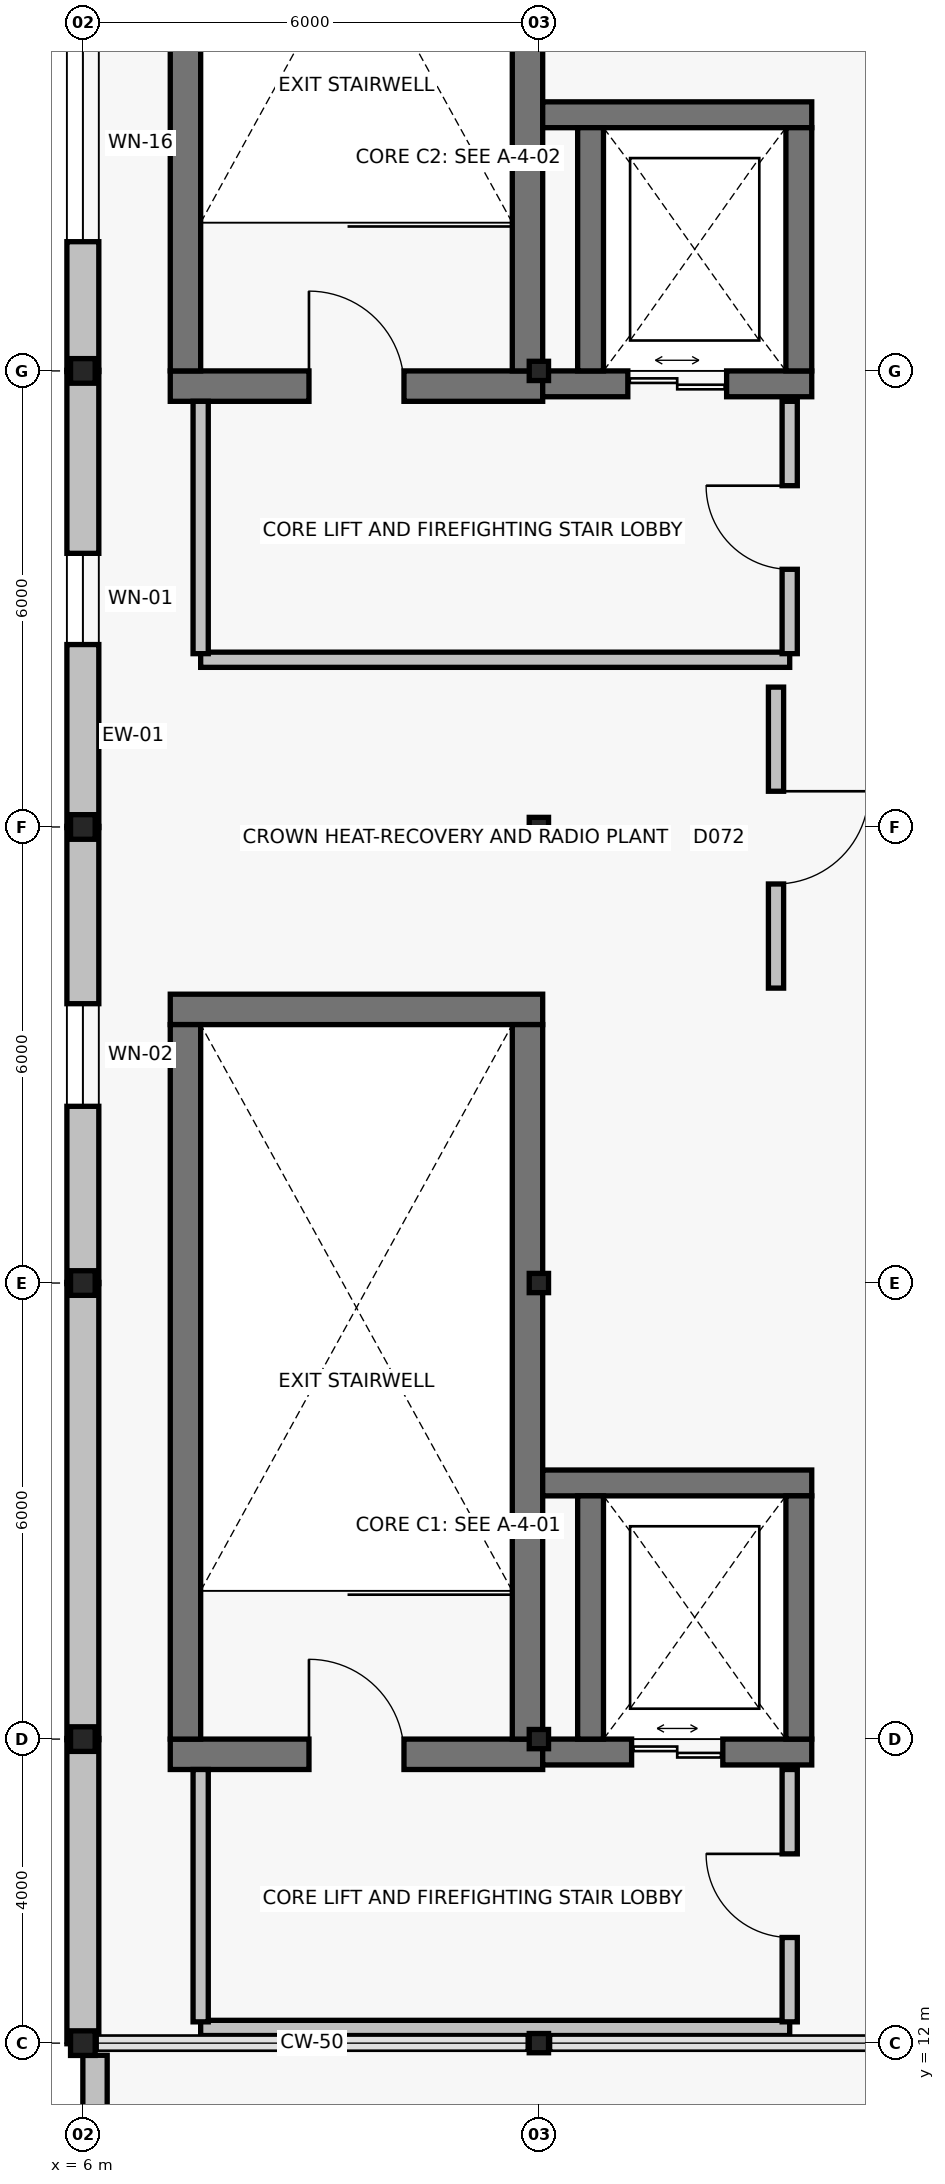
"""IFC4 building model, lengths in metres.
Left out: names, types, materials, properties, quantities, classifications, styles, units other than length and angle.
Written with IfcOpenShell. Run it as: python <this file> out.ifc"""

import sys

from ifc_helpers import new_model, si_unit, direction, frame, frame_2d, origin, origin_2d, place, context, subcontext, project, spatial, rectangle, hollow_circle, i_section, extrude, element, fill, save


model = new_model("IFC4")
c1 = context("Model", 3, precision=1e-05, world=origin(), true_north=direction((0.0, 1.0)))
c2 = subcontext(c1, "Body", "Model", "MODEL_VIEW")
j1 = project(units=[si_unit("LENGTHUNIT", "METRE"), si_unit("PLANEANGLEUNIT", "RADIAN")], contexts=[c1])
p1 = place(None, origin())
s1 = spatial("IfcSite", under=j1, at=p1, CompositionType="ELEMENT")
p2 = place(p1, origin())
s2 = spatial("IfcBuilding", under=s1, at=p2, CompositionType="ELEMENT")
p3 = place(p2, frame((0.0, 0.0, 28.6)))
s3 = spatial("IfcBuildingStorey", under=s2, at=p3, CompositionType="ELEMENT", Elevation=28.6)
for number, where, z_axis, x_axis in (
    (1, (6.0, 12.0, 0.0), (0.0, 0.0, 1.0), (1.0, 0.0, 0.0)),
    (2, (6.0, 16.0, 0.0), (0.0, 0.0, 1.0), (1.0, 0.0, 0.0)),
    (3, (6.0, 22.0, 0.0), (0.0, 0.0, 1.0), (1.0, 0.0, 0.0)),
    (4, (6.0, 28.0, 0.0), (0.0, 0.0, 1.0), (1.0, 0.0, 0.0)),
    (5, (6.0, 34.0, 0.0), (0.0, 0.0, 1.0), (1.0, 0.0, 0.0)),
):
    element("IfcColumn", number, at=place(p3, frame(where, z_axis=z_axis, x_axis=x_axis)), inside=s3, PredefinedType="COLUMN", context=c2, shape_type="SweptSolid", body=[
        extrude(hollow_circle(Radius=0.162, WallThickness=0.013, at=origin_2d()), origin(), (0.0, 0.0, 1.0), 4.2),
    ])
for number, where, z_axis, x_axis in (
    (6, (12.0, 12.0, 0.0), (0.0, 0.0, 1.0), (1.0, 0.0, 0.0)),
    (7, (12.0, 16.0, 0.0), (0.0, 0.0, 1.0), (1.0, 0.0, 0.0)),
    (8, (12.0, 22.0, 0.0), (0.0, 0.0, 1.0), (1.0, 0.0, 0.0)),
    (9, (12.0, 28.0, 0.0), (0.0, 0.0, 1.0), (1.0, 0.0, 0.0)),
    (10, (12.0, 34.0, 0.0), (0.0, 0.0, 1.0), (1.0, 0.0, 0.0)),
):
    element("IfcColumn", number, at=place(p3, frame(where, z_axis=z_axis, x_axis=x_axis)), inside=s3, PredefinedType="COLUMN", context=c2, shape_type="SweptSolid", body=[
        extrude(i_section(OverallWidth=0.254, OverallDepth=0.253, WebThickness=0.009, FlangeThickness=0.014, FilletRadius=0.012, at=origin_2d()), origin(), (0.0, 0.0, 1.0), 4.2),
    ])
p4 = place(p3, frame((6.0, 40.008, 0.0), z_axis=(0.0, 0.0, 1.0), x_axis=(0.0, -1.0, 0.0)))
e11 = element("IfcWall", 11, at=p4, inside=s3, PredefinedType="SOLIDWALL", context=c2, shape_type="SweptSolid", body=[
    extrude(rectangle(XDim=6.016, YDim=0.42, at=frame_2d((3.008, 0.0))), origin(), (0.0, 0.0, 1.0), 3.497),
])
p5 = place(p4, frame((1.708, 0.0, 0.9)))
e12 = element("IfcOpeningElement", 12, at=p5, cuts=e11, PredefinedType="OPENING", context=c2, shape_type="SweptSolid", body=[
    extrude(rectangle(XDim=2.6, YDim=2.1, at=frame_2d((1.3, 1.05))), frame((0.0, 0.225, 0.0), z_axis=(0.0, -1.0, 0.0), x_axis=(1.0, 0.0, 0.0)), (0.0, 0.0, 1.0), 0.45),
])
p6 = place(p3, frame((6.0, 34.008, 0.0), z_axis=(0.0, 0.0, 1.0), x_axis=(0.0, -1.0, 0.0)))
e13 = element("IfcWall", 13, at=p6, inside=s3, PredefinedType="SOLIDWALL", context=c2, shape_type="SweptSolid", body=[
    extrude(rectangle(XDim=6.016, YDim=0.42, at=frame_2d((3.008, 0.0))), origin(), (0.0, 0.0, 1.0), 3.497),
])
p7 = place(p6, frame((2.408, 0.0, 0.9)))
e14 = element("IfcOpeningElement", 14, at=p7, cuts=e13, PredefinedType="OPENING", context=c2, shape_type="SweptSolid", body=[
    extrude(rectangle(XDim=1.2, YDim=1.8, at=frame_2d((0.6, 0.9))), frame((0.0, 0.225, 0.0), z_axis=(0.0, -1.0, 0.0), x_axis=(1.0, 0.0, 0.0)), (0.0, 0.0, 1.0), 0.45),
])
p8 = place(p3, frame((6.0, 28.008, 0.0), z_axis=(0.0, 0.0, 1.0), x_axis=(0.0, -1.0, 0.0)))
e15 = element("IfcWall", 15, at=p8, inside=s3, PredefinedType="SOLIDWALL", context=c2, shape_type="SweptSolid", body=[
    extrude(rectangle(XDim=6.016, YDim=0.42, at=frame_2d((3.008, 0.0))), origin(), (0.0, 0.0, 1.0), 3.497),
])
p9 = place(p8, frame((2.333, 0.0, 0.9)))
e16 = element("IfcOpeningElement", 16, at=p9, cuts=e15, PredefinedType="OPENING", context=c2, shape_type="SweptSolid", body=[
    extrude(rectangle(XDim=1.35, YDim=1.8, at=frame_2d((0.675, 0.9))), frame((0.0, 0.225, 0.0), z_axis=(0.0, -1.0, 0.0), x_axis=(1.0, 0.0, 0.0)), (0.0, 0.0, 1.0), 0.45),
])
p10 = place(p3, frame((6.0, 22.008, 0.0), z_axis=(0.0, 0.0, 1.0), x_axis=(0.0, -1.0, 0.0)))
e17 = element("IfcWall", 17, at=p10, inside=s3, PredefinedType="SOLIDWALL", context=c2, shape_type="SweptSolid", body=[
    extrude(rectangle(XDim=6.016, YDim=0.42, at=frame_2d((3.008, 0.0))), origin(), (0.0, 0.0, 1.0), 3.497),
])
p11 = place(p3, frame((6.0, 16.008, 0.0), z_axis=(0.0, 0.0, 1.0), x_axis=(0.0, -1.0, 0.0)))
e18 = element("IfcWall", 18, at=p11, inside=s3, PredefinedType="SOLIDWALL", context=c2, shape_type="SweptSolid", body=[
    extrude(rectangle(XDim=4.016, YDim=0.42, at=frame_2d((2.008, 0.0))), origin(), (0.0, 0.0, 1.0), 3.55),
])
p12 = place(p3, frame((6.16, 4.66, 0.0), z_axis=(0.0, 0.0, 1.0), x_axis=(0.0, 1.0, 0.0)))
e19 = element("IfcWall", 19, at=p12, inside=s3, PredefinedType="PARAPET", context=c2, shape_type="SweptSolid", body=[
    extrude(rectangle(XDim=7.18, YDim=0.32, at=frame_2d((3.59, 0.0))), origin(), (0.0, 0.0, 1.0), 1.15),
])
p13 = place(p3, frame((7.15, 15.8, 0.0), z_axis=(0.0, 0.0, 1.0), x_axis=(1.0, 0.0, 0.0)))
e20 = element("IfcWall", 20, at=p13, inside=s3, PredefinedType="SHEAR", context=c2, shape_type="SweptSolid", body=[
    extrude(rectangle(XDim=4.9, YDim=0.4, at=frame_2d((2.45, 0.0))), origin(), (0.0, 0.0, 1.0), 4.0),
])
p14 = place(p13, frame((1.825, 0.0, 0.0)))
e21 = element("IfcOpeningElement", 21, at=p14, cuts=e20, PredefinedType="OPENING", context=c2, shape_type="SweptSolid", body=[
    extrude(rectangle(XDim=1.25, YDim=2.2, at=frame_2d((0.625, 1.1))), frame((0.0, 0.215, 0.0), z_axis=(0.0, -1.0, 0.0), x_axis=(1.0, 0.0, 0.0)), (0.0, 0.0, 1.0), 0.43),
])
p15 = place(p3, frame((12.05, 25.6, 0.0), z_axis=(0.0, 0.0, 1.0), x_axis=(-1.0, 0.0, 0.0)))
e22 = element("IfcWall", 22, at=p15, inside=s3, PredefinedType="SHEAR", context=c2, shape_type="SweptSolid", body=[
    extrude(rectangle(XDim=4.9, YDim=0.4, at=frame_2d((2.45, 0.0))), origin(), (0.0, 0.0, 1.0), 4.0),
])
for number, where, z_axis, x_axis in (
    (23, (7.35, 25.4, 0.0), (0.0, 0.0, 1.0), (0.0, -1.0, 0.0)),
    (24, (11.85, 16.0, 0.0), (0.0, 0.0, 1.0), (0.0, 1.0, 0.0)),
):
    element("IfcWall", number, at=place(p3, frame(where, z_axis=z_axis, x_axis=x_axis)), inside=s3, PredefinedType="SHEAR", context=c2, shape_type="SweptSolid", body=[
        extrude(rectangle(XDim=9.4, YDim=0.4, at=frame_2d((4.7, 0.0))), origin(), (0.0, 0.0, 1.0), 4.0),
    ])
p16 = place(p3, frame((12.05, 15.83, 0.0), z_axis=(0.0, 0.0, 1.0), x_axis=(1.0, 0.0, 0.0)))
e25 = element("IfcWall", 25, at=p16, inside=s3, PredefinedType="SHEAR", context=c2, shape_type="SweptSolid", body=[
    extrude(rectangle(XDim=3.54, YDim=0.34, at=frame_2d((1.77, 0.0))), origin(), (0.0, 0.0, 1.0), 4.0),
])
p17 = place(p16, frame((1.17, 0.0, 0.0)))
e26 = element("IfcOpeningElement", 26, at=p17, cuts=e25, PredefinedType="OPENING", context=c2, shape_type="SweptSolid", body=[
    extrude(rectangle(XDim=1.2, YDim=2.2, at=frame_2d((0.6, 1.1))), frame((0.0, 0.185, 0.0), z_axis=(0.0, -1.0, 0.0), x_axis=(1.0, 0.0, 0.0)), (0.0, 0.0, 1.0), 0.37),
])
p18 = place(p3, frame((15.59, 19.37, 0.0), z_axis=(0.0, 0.0, 1.0), x_axis=(-1.0, 0.0, 0.0)))
e27 = element("IfcWall", 27, at=p18, inside=s3, PredefinedType="SHEAR", context=c2, shape_type="SweptSolid", body=[
    extrude(rectangle(XDim=3.54, YDim=0.34, at=frame_2d((1.77, 0.0))), origin(), (0.0, 0.0, 1.0), 4.0),
])
for number, where, z_axis, x_axis in (
    (28, (12.68, 19.2, 0.0), (0.0, 0.0, 1.0), (0.0, -1.0, 0.0)),
    (29, (15.42, 16.0, 0.0), (0.0, 0.0, 1.0), (0.0, 1.0, 0.0)),
):
    element("IfcWall", number, at=place(p3, frame(where, z_axis=z_axis, x_axis=x_axis)), inside=s3, PredefinedType="SHEAR", context=c2, shape_type="SweptSolid", body=[
        extrude(rectangle(XDim=3.2, YDim=0.34, at=frame_2d((1.6, 0.0))), origin(), (0.0, 0.0, 1.0), 4.0),
    ])
p19 = place(p3, frame((7.55, 12.2, 0.0), z_axis=(0.0, 0.0, 1.0), x_axis=(1.0, 0.0, 0.0)))
e30 = element("IfcWall", 30, at=p19, inside=s3, PredefinedType="PARTITIONING", context=c2, shape_type="SweptSolid", body=[
    extrude(rectangle(XDim=7.75, YDim=0.2, at=frame_2d((3.875, 0.0))), origin(), (0.0, 0.0, 1.0), 3.497),
])
p20 = place(p3, frame((7.55, 15.6, 0.0), z_axis=(0.0, 0.0, 1.0), x_axis=(0.0, -1.0, 0.0)))
e31 = element("IfcWall", 31, at=p20, inside=s3, PredefinedType="PARTITIONING", context=c2, shape_type="SweptSolid", body=[
    extrude(rectangle(XDim=3.32, YDim=0.2, at=frame_2d((1.66, 0.0))), origin(), (0.0, 0.0, 1.0), 3.55),
])
p21 = place(p3, frame((15.3, 12.28, 0.0), z_axis=(0.0, 0.0, 1.0), x_axis=(0.0, 1.0, 0.0)))
e32 = element("IfcWall", 32, at=p21, inside=s3, PredefinedType="PARTITIONING", context=c2, shape_type="SweptSolid", body=[
    extrude(rectangle(XDim=3.32, YDim=0.2, at=frame_2d((1.66, 0.0))), origin(), (0.0, 0.0, 1.0), 3.604),
])
p22 = place(p21, frame((1.11, 0.0, 0.0)))
e33 = element("IfcOpeningElement", 33, at=p22, cuts=e32, PredefinedType="OPENING", context=c2, shape_type="SweptSolid", body=[
    extrude(rectangle(XDim=1.1, YDim=2.15, at=frame_2d((0.55, 1.075))), frame((0.0, 0.115, 0.0), z_axis=(0.0, -1.0, 0.0), x_axis=(1.0, 0.0, 0.0)), (0.0, 0.0, 1.0), 0.23),
])
p23 = place(p3, frame((7.15, 33.8, 0.0), z_axis=(0.0, 0.0, 1.0), x_axis=(1.0, 0.0, 0.0)))
e34 = element("IfcWall", 34, at=p23, inside=s3, PredefinedType="SHEAR", context=c2, shape_type="SweptSolid", body=[
    extrude(rectangle(XDim=4.9, YDim=0.4, at=frame_2d((2.45, 0.0))), origin(), (0.0, 0.0, 1.0), 4.0),
])
p24 = place(p23, frame((1.825, 0.0, 0.0)))
e35 = element("IfcOpeningElement", 35, at=p24, cuts=e34, PredefinedType="OPENING", context=c2, shape_type="SweptSolid", body=[
    extrude(rectangle(XDim=1.25, YDim=2.2, at=frame_2d((0.625, 1.1))), frame((0.0, 0.215, 0.0), z_axis=(0.0, -1.0, 0.0), x_axis=(1.0, 0.0, 0.0)), (0.0, 0.0, 1.0), 0.43),
])
for number, where, z_axis, x_axis in (
    (36, (7.35, 43.4, 0.0), (0.0, 0.0, 1.0), (0.0, -1.0, 0.0)),
    (37, (11.85, 34.0, 0.0), (0.0, 0.0, 1.0), (0.0, 1.0, 0.0)),
):
    element("IfcWall", number, at=place(p3, frame(where, z_axis=z_axis, x_axis=x_axis)), inside=s3, PredefinedType="SHEAR", context=c2, shape_type="SweptSolid", body=[
        extrude(rectangle(XDim=9.4, YDim=0.4, at=frame_2d((4.7, 0.0))), origin(), (0.0, 0.0, 1.0), 4.0),
    ])
p25 = place(p3, frame((12.05, 33.83, 0.0), z_axis=(0.0, 0.0, 1.0), x_axis=(1.0, 0.0, 0.0)))
e38 = element("IfcWall", 38, at=p25, inside=s3, PredefinedType="SHEAR", context=c2, shape_type="SweptSolid", body=[
    extrude(rectangle(XDim=3.54, YDim=0.34, at=frame_2d((1.77, 0.0))), origin(), (0.0, 0.0, 1.0), 4.0),
])
p26 = place(p25, frame((1.12, 0.0, 0.0)))
e39 = element("IfcOpeningElement", 39, at=p26, cuts=e38, PredefinedType="OPENING", context=c2, shape_type="SweptSolid", body=[
    extrude(rectangle(XDim=1.3, YDim=2.25, at=frame_2d((0.65, 1.125))), frame((0.0, 0.185, 0.0), z_axis=(0.0, -1.0, 0.0), x_axis=(1.0, 0.0, 0.0)), (0.0, 0.0, 1.0), 0.37),
])
p27 = place(p3, frame((15.59, 37.37, 0.0), z_axis=(0.0, 0.0, 1.0), x_axis=(-1.0, 0.0, 0.0)))
e40 = element("IfcWall", 40, at=p27, inside=s3, PredefinedType="SHEAR", context=c2, shape_type="SweptSolid", body=[
    extrude(rectangle(XDim=3.54, YDim=0.34, at=frame_2d((1.77, 0.0))), origin(), (0.0, 0.0, 1.0), 4.0),
])
for number, where, z_axis, x_axis in (
    (41, (12.68, 37.2, 0.0), (0.0, 0.0, 1.0), (0.0, -1.0, 0.0)),
    (42, (15.42, 34.0, 0.0), (0.0, 0.0, 1.0), (0.0, 1.0, 0.0)),
):
    element("IfcWall", number, at=place(p3, frame(where, z_axis=z_axis, x_axis=x_axis)), inside=s3, PredefinedType="SHEAR", context=c2, shape_type="SweptSolid", body=[
        extrude(rectangle(XDim=3.2, YDim=0.34, at=frame_2d((1.6, 0.0))), origin(), (0.0, 0.0, 1.0), 4.0),
    ])
p28 = place(p3, frame((7.55, 30.2, 0.0), z_axis=(0.0, 0.0, 1.0), x_axis=(1.0, 0.0, 0.0)))
e43 = element("IfcWall", 43, at=p28, inside=s3, PredefinedType="PARTITIONING", context=c2, shape_type="SweptSolid", body=[
    extrude(rectangle(XDim=7.75, YDim=0.2, at=frame_2d((3.875, 0.0))), origin(), (0.0, 0.0, 1.0), 3.497),
])
p29 = place(p3, frame((7.55, 33.6, 0.0), z_axis=(0.0, 0.0, 1.0), x_axis=(0.0, -1.0, 0.0)))
e44 = element("IfcWall", 44, at=p29, inside=s3, PredefinedType="PARTITIONING", context=c2, shape_type="SweptSolid", body=[
    extrude(rectangle(XDim=3.32, YDim=0.2, at=frame_2d((1.66, 0.0))), origin(), (0.0, 0.0, 1.0), 4.0),
])
p30 = place(p3, frame((15.3, 30.28, 0.0), z_axis=(0.0, 0.0, 1.0), x_axis=(0.0, 1.0, 0.0)))
e45 = element("IfcWall", 45, at=p30, inside=s3, PredefinedType="PARTITIONING", context=c2, shape_type="SweptSolid", body=[
    extrude(rectangle(XDim=3.32, YDim=0.2, at=frame_2d((1.66, 0.0))), origin(), (0.0, 0.0, 1.0), 4.0),
])
p31 = place(p30, frame((1.11, 0.0, 0.0)))
e46 = element("IfcOpeningElement", 46, at=p31, cuts=e45, PredefinedType="OPENING", context=c2, shape_type="SweptSolid", body=[
    extrude(rectangle(XDim=1.1, YDim=2.15, at=frame_2d((0.55, 1.075))), frame((0.0, 0.115, 0.0), z_axis=(0.0, -1.0, 0.0), x_axis=(1.0, 0.0, 0.0)), (0.0, 0.0, 1.0), 0.23),
])
p32 = place(p3, frame((15.12, 29.84, 0.0), z_axis=(0.0, 0.0, 1.0), x_axis=(0.0, -1.0, 0.0)))
e47 = element("IfcWall", 47, at=p32, inside=s3, PredefinedType="PARTITIONING", context=c2, shape_type="SweptSolid", body=[
    extrude(rectangle(XDim=3.96, YDim=0.2, at=frame_2d((1.98, 0.0))), origin(), (0.0, 0.0, 1.0), 3.606),
])
p33 = place(p32, frame((1.37, 0.0, 0.0)))
e48 = element("IfcOpeningElement", 48, at=p33, cuts=e47, PredefinedType="OPENING", context=c2, shape_type="SweptSolid", body=[
    extrude(rectangle(XDim=1.22, YDim=2.2, at=frame_2d((0.61, 1.1))), frame((0.0, 0.115, 0.0), z_axis=(0.0, -1.0, 0.0), x_axis=(1.0, 0.0, 0.0)), (0.0, 0.0, 1.0), 0.23),
])
p34 = place(p5, origin())
e49 = element("IfcWindow", 49, at=p34, inside=s3, PartitioningType="SINGLE_PANEL", PredefinedType="WINDOW", context=c2, shape_type="SweptSolid", body=[
    extrude(rectangle(XDim=2.6, YDim=2.1, at=frame_2d((1.3, 1.05))), frame((0.0, 0.03, 0.0), z_axis=(0.0, -1.0, 0.0), x_axis=(1.0, 0.0, 0.0)), (0.0, 0.0, 1.0), 0.06),
])
fill(e12, e49)
p35 = place(p7, origin())
e50 = element("IfcWindow", 50, at=p35, inside=s3, PartitioningType="SINGLE_PANEL", PredefinedType="WINDOW", context=c2, shape_type="SweptSolid", body=[
    extrude(rectangle(XDim=1.2, YDim=1.8, at=frame_2d((0.6, 0.9))), frame((0.0, 0.03, 0.0), z_axis=(0.0, -1.0, 0.0), x_axis=(1.0, 0.0, 0.0)), (0.0, 0.0, 1.0), 0.06),
])
fill(e14, e50)
p36 = place(p9, origin())
e51 = element("IfcWindow", 51, at=p36, inside=s3, PartitioningType="SINGLE_PANEL", PredefinedType="WINDOW", context=c2, shape_type="SweptSolid", body=[
    extrude(rectangle(XDim=1.35, YDim=1.8, at=frame_2d((0.675, 0.9))), frame((0.0, 0.03, 0.0), z_axis=(0.0, -1.0, 0.0), x_axis=(1.0, 0.0, 0.0)), (0.0, 0.0, 1.0), 0.06),
])
fill(e16, e51)
p37 = place(p14, origin())
e52 = element("IfcDoor", 52, at=p37, inside=s3, OperationType="SINGLE_SWING_LEFT", PredefinedType="DOOR", context=c2, shape_type="SweptSolid", body=[
    extrude(rectangle(XDim=1.25, YDim=2.2, at=frame_2d((0.625, 1.1))), frame((0.0, 0.025, 0.0), z_axis=(0.0, -1.0, 0.0), x_axis=(1.0, 0.0, 0.0)), (0.0, 0.0, 1.0), 0.05),
])
fill(e21, e52)
p38 = place(p17, origin())
e53 = element("IfcDoor", 53, at=p38, inside=s3, OperationType="DOUBLE_DOOR_SLIDING", PredefinedType="DOOR", context=c2, shape_type="SweptSolid", body=[
    extrude(rectangle(XDim=1.2, YDim=2.2, at=frame_2d((0.6, 1.1))), frame((0.0, 0.025, 0.0), z_axis=(0.0, -1.0, 0.0), x_axis=(1.0, 0.0, 0.0)), (0.0, 0.0, 1.0), 0.05),
])
fill(e26, e53)
p39 = place(p22, origin())
e54 = element("IfcDoor", 54, at=p39, inside=s3, OperationType="SINGLE_SWING_RIGHT", PredefinedType="DOOR", context=c2, shape_type="SweptSolid", body=[
    extrude(rectangle(XDim=1.1, YDim=2.15, at=frame_2d((0.55, 1.075))), frame((0.0, 0.025, 0.0), z_axis=(0.0, -1.0, 0.0), x_axis=(1.0, 0.0, 0.0)), (0.0, 0.0, 1.0), 0.05),
])
fill(e33, e54)
p40 = place(p24, origin())
e55 = element("IfcDoor", 55, at=p40, inside=s3, OperationType="SINGLE_SWING_LEFT", PredefinedType="DOOR", context=c2, shape_type="SweptSolid", body=[
    extrude(rectangle(XDim=1.25, YDim=2.2, at=frame_2d((0.625, 1.1))), frame((0.0, 0.025, 0.0), z_axis=(0.0, -1.0, 0.0), x_axis=(1.0, 0.0, 0.0)), (0.0, 0.0, 1.0), 0.05),
])
fill(e35, e55)
p41 = place(p26, origin())
e56 = element("IfcDoor", 56, at=p41, inside=s3, OperationType="DOUBLE_DOOR_SLIDING", PredefinedType="DOOR", context=c2, shape_type="SweptSolid", body=[
    extrude(rectangle(XDim=1.3, YDim=2.25, at=frame_2d((0.65, 1.125))), frame((0.0, 0.025, 0.0), z_axis=(0.0, -1.0, 0.0), x_axis=(1.0, 0.0, 0.0)), (0.0, 0.0, 1.0), 0.05),
])
fill(e39, e56)
p42 = place(p31, origin())
e57 = element("IfcDoor", 57, at=p42, inside=s3, OperationType="SINGLE_SWING_RIGHT", PredefinedType="DOOR", context=c2, shape_type="SweptSolid", body=[
    extrude(rectangle(XDim=1.1, YDim=2.15, at=frame_2d((0.55, 1.075))), frame((0.0, 0.025, 0.0), z_axis=(0.0, -1.0, 0.0), x_axis=(1.0, 0.0, 0.0)), (0.0, 0.0, 1.0), 0.05),
])
fill(e46, e57)
p43 = place(p33, origin())
e58 = element("IfcDoor", 58, at=p43, inside=s3, OperationType="SINGLE_SWING_LEFT", PredefinedType="DOOR", context=c2, shape_type="SweptSolid", body=[
    extrude(rectangle(XDim=1.22, YDim=2.2, at=frame_2d((0.61, 1.1))), frame((0.0, 0.025, 0.0), z_axis=(0.0, -1.0, 0.0), x_axis=(1.0, 0.0, 0.0)), (0.0, 0.0, 1.0), 0.05),
])
fill(e48, e58)
save(model, sys.argv[1])
